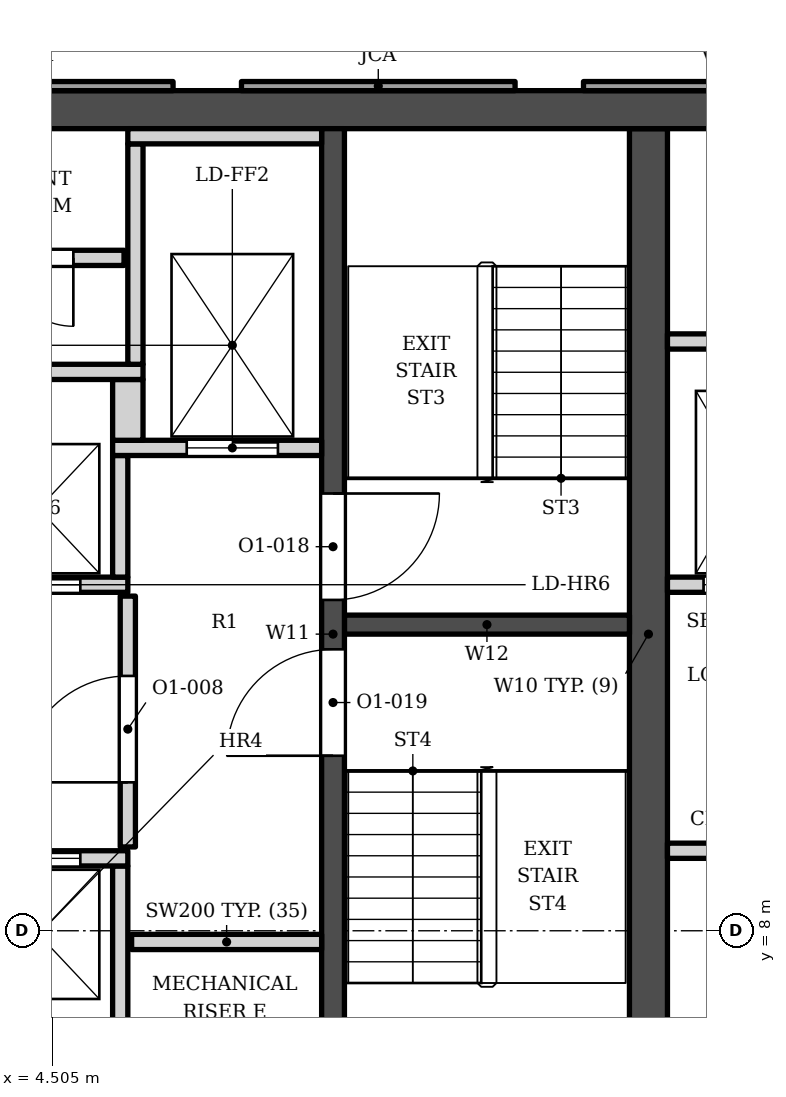
"""IFC4 building model, lengths in metres.
Left out: names, types, materials, properties, quantities, classifications, styles, units other than length and angle.
Written with IfcOpenShell. Run it as: python <this file> out.ifc"""

import sys

from ifc_helpers import new_model, si_unit, direction, frame, frame_2d, origin, place, context, subcontext, project, spatial, polyline, rectangle, outline, extrude, element, fill, save


model = new_model("IFC4")
c1 = context("Model", 3, precision=1e-05, world=origin(), true_north=direction((0.0, 1.0)))
c2 = subcontext(c1, "Body", "Model", "MODEL_VIEW")
j1 = project(units=[si_unit("LENGTHUNIT", "METRE"), si_unit("PLANEANGLEUNIT", "RADIAN")], contexts=[c1])
p1 = place(None, origin())
s1 = spatial("IfcSite", under=j1, at=p1, CompositionType="ELEMENT")
p2 = place(p1, origin())
s2 = spatial("IfcBuilding", under=s1, at=p2, CompositionType="ELEMENT")
p3 = place(p2, frame((0.0, 0.0, 144.6)))
s3 = spatial("IfcBuildingStorey", under=s2, at=p3, CompositionType="ELEMENT", Elevation=144.6)
p4 = place(p3, frame((-15.1, 18.802, 0.0), z_axis=(0.0, 0.0, 1.0), x_axis=(1.0, 0.0, 0.0)))
e1 = element("IfcWall", 1, at=p4, inside=s3, PredefinedType="SHEAR", context=c2, shape_type="SweptSolid", body=[
    extrude(rectangle(XDim=30.2, YDim=0.5, at=frame_2d((15.1, 0.0))), origin(), (0.0, 0.0, 1.0), 3.9),
])
p5 = place(p3, frame((12.35, 5.253, 0.0), z_axis=(0.0, 0.0, 1.0), x_axis=(0.0, 1.0, 0.0)))
e2 = element("IfcWall", 2, at=p5, inside=s3, PredefinedType="SHEAR", context=c2, shape_type="SweptSolid", body=[
    extrude(rectangle(XDim=13.3, YDim=0.5, at=frame_2d((6.65, 0.0))), origin(), (0.0, 0.0, 1.0), 3.9),
])
p6 = place(p3, frame((8.2, 5.253, 0.0), z_axis=(0.0, 0.0, 1.0), x_axis=(0.0, 1.0, 0.0)))
e3 = element("IfcWall", 3, at=p6, inside=s3, PredefinedType="SHEAR", context=c2, shape_type="SweptSolid", body=[
    extrude(rectangle(XDim=13.3, YDim=0.3, at=frame_2d((6.65, 0.0))), origin(), (0.0, 0.0, 1.0), 3.9),
])
p7 = place(p6, frame((7.1, 0.0, 0.0)))
e4 = element("IfcOpeningElement", 4, at=p7, cuts=e3, PredefinedType="OPENING", context=c2, shape_type="SweptSolid", body=[
    extrude(rectangle(XDim=1.4, YDim=2.1, at=frame_2d((0.7, 1.05))), frame((0.0, 0.16, 0.0), z_axis=(0.0, -1.0, 0.0), x_axis=(1.0, 0.0, 0.0)), (0.0, 0.0, 1.0), 0.32),
])
p8 = place(p6, frame((5.05, 0.0, 0.0)))
e5 = element("IfcOpeningElement", 5, at=p8, cuts=e3, PredefinedType="OPENING", context=c2, shape_type="SweptSolid", body=[
    extrude(rectangle(XDim=1.4, YDim=2.1, at=frame_2d((0.7, 1.05))), frame((0.0, 0.16, 0.0), z_axis=(0.0, -1.0, 0.0), x_axis=(1.0, 0.0, 0.0)), (0.0, 0.0, 1.0), 0.32),
])
p9 = place(p3, frame((8.35, 12.028, 0.0), z_axis=(0.0, 0.0, 1.0), x_axis=(1.0, 0.0, 0.0)))
e6 = element("IfcWall", 6, at=p9, inside=s3, PredefinedType="SHEAR", context=c2, shape_type="SweptSolid", body=[
    extrude(rectangle(XDim=3.75, YDim=0.25, at=frame_2d((1.875, 0.0))), origin(), (0.0, 0.0, 1.0), 3.9),
])
p10 = place(p3, origin())
e7 = element("IfcWall", 7, at=p10, inside=s3, PredefinedType="ELEMENTEDWALL", context=c2, shape_type="SweptSolid", body=[
    extrude(outline(polyline([(11.495, 19.173), (11.495, 19.052), (15.095, 19.052), (15.095, 19.173), (11.495, 19.173)])), origin(), (0.0, 0.0, 1.0), 3.0),
])
p11 = place(p3, origin())
e8 = element("IfcWall", 8, at=p11, inside=s3, PredefinedType="SOLIDWALL", context=c2, shape_type="SweptSolid", body=[
    extrude(outline(polyline([(6.995, 19.173), (6.995, 19.052), (10.595, 19.052), (10.595, 19.173), (6.995, 19.173)])), origin(), (0.0, 0.0, 1.0), 3.0),
])
p12 = place(p3, origin())
e9 = element("IfcWall", 9, at=p12, inside=s3, PredefinedType="ELEMENTEDWALL", context=c2, shape_type="SweptSolid", body=[
    extrude(outline(polyline([(2.495, 19.173), (2.495, 19.052), (6.095, 19.052), (6.095, 19.173), (2.495, 19.173)])), origin(), (0.0, 0.0, 1.0), 3.0),
])
for number, where, z_axis, x_axis in (
    (10, (5.4, 6.353, 0.0), (0.0, 0.0, 1.0), (0.0, 1.0, 0.0)),
    (11, (5.55, 7.853, 0.0), (0.0, 0.0, 1.0), (1.0, 0.0, 0.0)),
):
    element("IfcWall", number, at=place(p3, frame(where, z_axis=z_axis, x_axis=x_axis)), inside=s3, PredefinedType="SOLIDWALL", context=c2, shape_type="SweptSolid", body=[
        extrude(rectangle(XDim=2.5, YDim=0.2, at=frame_2d((1.25, 0.0))), origin(), (0.0, 0.0, 1.0), 3.73),
    ])
p13 = place(p3, frame((1.0, 8.953, 0.0), z_axis=(0.0, 0.0, 1.0), x_axis=(1.0, 0.0, 0.0)))
e12 = element("IfcWall", 12, at=p13, inside=s3, PredefinedType="SOLIDWALL", context=c2, shape_type="SweptSolid", body=[
    extrude(rectangle(XDim=4.5, YDim=0.2, at=frame_2d((2.25, 0.0))), origin(), (0.0, 0.0, 1.0), 3.73),
])
p14 = place(p13, frame((0.625, 0.0, 0.0)))
e13 = element("IfcOpeningElement", 13, at=p14, cuts=e12, PredefinedType="OPENING", context=c2, shape_type="SweptSolid", body=[
    extrude(rectangle(XDim=1.1, YDim=2.1, at=frame_2d((0.55, 1.05))), frame((0.0, 0.11, 0.0), z_axis=(0.0, -1.0, 0.0), x_axis=(1.0, 0.0, 0.0)), (0.0, 0.0, 1.0), 0.22),
])
p15 = place(p13, frame((2.775, 0.0, 0.0)))
e14 = element("IfcOpeningElement", 14, at=p15, cuts=e12, PredefinedType="OPENING", context=c2, shape_type="SweptSolid", body=[
    extrude(rectangle(XDim=1.1, YDim=2.1, at=frame_2d((0.55, 1.05))), frame((0.0, 0.11, 0.0), z_axis=(0.0, -1.0, 0.0), x_axis=(1.0, 0.0, 0.0)), (0.0, 0.0, 1.0), 0.22),
])
p16 = place(p3, frame((12.6, 9.052, 0.0), z_axis=(0.0, 0.0, 1.0), x_axis=(1.0, 0.0, 0.0)))
e15 = element("IfcWall", 15, at=p16, inside=s3, PredefinedType="PARTITIONING", context=c2, shape_type="SweptSolid", body=[
    extrude(rectangle(XDim=2.5, YDim=0.2, at=frame_2d((1.25, 0.0))), origin(), (0.0, 0.0, 1.0), 3.73),
])
p17 = place(p3, frame((5.5, 9.103, 0.0), z_axis=(0.0, 0.0, 1.0), x_axis=(0.0, 1.0, 0.0)))
e16 = element("IfcWall", 16, at=p17, inside=s3, PredefinedType="SOLIDWALL", context=c2, shape_type="SweptSolid", body=[
    extrude(rectangle(XDim=3.3, YDim=0.2, at=frame_2d((1.65, 0.0))), origin(), (0.0, 0.0, 1.0), 3.73),
])
p18 = place(p17, frame((0.85, 0.0, 0.0)))
e17 = element("IfcOpeningElement", 17, at=p18, cuts=e16, PredefinedType="OPENING", context=c2, shape_type="SweptSolid", body=[
    extrude(rectangle(XDim=1.4, YDim=2.1, at=frame_2d((0.7, 1.05))), frame((0.0, 0.11, 0.0), z_axis=(0.0, -1.0, 0.0), x_axis=(1.0, 0.0, 0.0)), (0.0, 0.0, 1.0), 0.22),
])
p19 = place(p3, frame((-1.5, 12.552, 0.0), z_axis=(0.0, 0.0, 1.0), x_axis=(1.0, 0.0, 0.0)))
e18 = element("IfcWall", 18, at=p19, inside=s3, PredefinedType="SOLIDWALL", context=c2, shape_type="SweptSolid", body=[
    extrude(rectangle(XDim=7.0, YDim=0.2, at=frame_2d((3.5, 0.0))), origin(), (0.0, 0.0, 1.0), 3.73),
])
p20 = place(p19, frame((3.075, 0.0, 0.0)))
e19 = element("IfcOpeningElement", 19, at=p20, cuts=e18, PredefinedType="OPENING", context=c2, shape_type="SweptSolid", body=[
    extrude(rectangle(XDim=1.1, YDim=2.1, at=frame_2d((0.55, 1.05))), frame((0.0, 0.11, 0.0), z_axis=(0.0, -1.0, 0.0), x_axis=(1.0, 0.0, 0.0)), (0.0, 0.0, 1.0), 0.22),
])
p21 = place(p19, frame((5.275, 0.0, 0.0)))
e20 = element("IfcOpeningElement", 20, at=p21, cuts=e18, PredefinedType="OPENING", context=c2, shape_type="SweptSolid", body=[
    extrude(rectangle(XDim=1.1, YDim=2.1, at=frame_2d((0.55, 1.05))), frame((0.0, 0.11, 0.0), z_axis=(0.0, -1.0, 0.0), x_axis=(1.0, 0.0, 0.0)), (0.0, 0.0, 1.0), 0.22),
])
p22 = place(p3, frame((12.6, 12.552, 0.0), z_axis=(0.0, 0.0, 1.0), x_axis=(1.0, 0.0, 0.0)))
e21 = element("IfcWall", 21, at=p22, inside=s3, PredefinedType="SOLIDWALL", context=c2, shape_type="SweptSolid", body=[
    extrude(rectangle(XDim=2.15, YDim=0.2, at=frame_2d((1.075, 0.0))), origin(), (0.0, 0.0, 1.0), 3.73),
])
p23 = place(p22, frame((0.475, 0.0, 0.0)))
e22 = element("IfcOpeningElement", 22, at=p23, cuts=e21, PredefinedType="OPENING", context=c2, shape_type="SweptSolid", body=[
    extrude(rectangle(XDim=1.2, YDim=2.1, at=frame_2d((0.6, 1.05))), frame((0.0, 0.11, 0.0), z_axis=(0.0, -1.0, 0.0), x_axis=(1.0, 0.0, 0.0)), (0.0, 0.0, 1.0), 0.22),
])
p24 = place(p3, frame((5.4, 12.653, 0.0), z_axis=(0.0, 0.0, 1.0), x_axis=(0.0, 1.0, 0.0)))
e23 = element("IfcWall", 23, at=p24, inside=s3, PredefinedType="SOLIDWALL", context=c2, shape_type="SweptSolid", body=[
    extrude(rectangle(XDim=1.6, YDim=0.2, at=frame_2d((0.8, 0.0))), origin(), (0.0, 0.0, 1.0), 3.73),
])
p25 = place(p3, frame((5.3, 14.353, 0.0), z_axis=(0.0, 0.0, 1.0), x_axis=(1.0, 0.0, 0.0)))
e24 = element("IfcWall", 24, at=p25, inside=s3, PredefinedType="SOLIDWALL", context=c2, shape_type="SweptSolid", body=[
    extrude(rectangle(XDim=2.75, YDim=0.2, at=frame_2d((1.375, 0.0))), origin(), (0.0, 0.0, 1.0), 3.73),
])
p26 = place(p25, frame((0.975, 0.0, 0.0)))
e25 = element("IfcOpeningElement", 25, at=p26, cuts=e24, PredefinedType="OPENING", context=c2, shape_type="SweptSolid", body=[
    extrude(rectangle(XDim=1.2, YDim=2.1, at=frame_2d((0.6, 1.05))), frame((0.0, 0.11, 0.0), z_axis=(0.0, -1.0, 0.0), x_axis=(1.0, 0.0, 0.0)), (0.0, 0.0, 1.0), 0.22),
])
p27 = place(p3, frame((5.5, 14.453, 0.0), z_axis=(0.0, 0.0, 1.0), x_axis=(0.0, 1.0, 0.0)))
e26 = element("IfcWall", 26, at=p27, inside=s3, PredefinedType="SOLIDWALL", context=c2, shape_type="SweptSolid", body=[
    extrude(rectangle(XDim=0.8, YDim=0.4, at=frame_2d((0.4, 0.0))), origin(), (0.0, 0.0, 1.0), 3.73),
])
p28 = place(p3, frame((-1.5, 15.353, 0.0), z_axis=(0.0, 0.0, 1.0), x_axis=(1.0, 0.0, 0.0)))
e27 = element("IfcWall", 27, at=p28, inside=s3, PredefinedType="SOLIDWALL", context=c2, shape_type="SweptSolid", body=[
    extrude(rectangle(XDim=7.2, YDim=0.2, at=frame_2d((3.6, 0.0))), origin(), (0.0, 0.0, 1.0), 3.73),
])
p29 = place(p3, frame((5.6, 15.453, 0.0), z_axis=(0.0, 0.0, 1.0), x_axis=(0.0, 1.0, 0.0)))
e28 = element("IfcWall", 28, at=p29, inside=s3, PredefinedType="SOLIDWALL", context=c2, shape_type="SweptSolid", body=[
    extrude(rectangle(XDim=2.9, YDim=0.2, at=frame_2d((1.45, 0.0))), origin(), (0.0, 0.0, 1.0), 3.73),
])
p30 = place(p3, frame((12.6, 15.753, 0.0), z_axis=(0.0, 0.0, 1.0), x_axis=(1.0, 0.0, 0.0)))
e29 = element("IfcWall", 29, at=p30, inside=s3, PredefinedType="SOLIDWALL", context=c2, shape_type="SweptSolid", body=[
    extrude(rectangle(XDim=2.15, YDim=0.2, at=frame_2d((1.075, 0.0))), origin(), (0.0, 0.0, 1.0), 3.73),
])
p31 = place(p3, frame((-1.6, 16.853, 0.0), z_axis=(0.0, 0.0, 1.0), x_axis=(1.0, 0.0, 0.0)))
e30 = element("IfcWall", 30, at=p31, inside=s3, PredefinedType="SOLIDWALL", context=c2, shape_type="SweptSolid", body=[
    extrude(rectangle(XDim=7.05, YDim=0.2, at=frame_2d((3.525, 0.0))), origin(), (0.0, 0.0, 1.0), 3.73),
])
p32 = place(p31, frame((0.817, 0.0, 0.0)))
e31 = element("IfcOpeningElement", 31, at=p32, cuts=e30, PredefinedType="OPENING", context=c2, shape_type="SweptSolid", body=[
    extrude(rectangle(XDim=0.9, YDim=2.1, at=frame_2d((0.45, 1.05))), frame((0.0, 0.11, 0.0), z_axis=(0.0, -1.0, 0.0), x_axis=(1.0, 0.0, 0.0)), (0.0, 0.0, 1.0), 0.22),
])
p33 = place(p31, frame((3.15, 0.0, 0.0)))
e32 = element("IfcOpeningElement", 32, at=p33, cuts=e30, PredefinedType="OPENING", context=c2, shape_type="SweptSolid", body=[
    extrude(rectangle(XDim=0.9, YDim=2.1, at=frame_2d((0.45, 1.05))), frame((0.0, 0.11, 0.0), z_axis=(0.0, -1.0, 0.0), x_axis=(1.0, 0.0, 0.0)), (0.0, 0.0, 1.0), 0.22),
])
p34 = place(p31, frame((5.483, 0.0, 0.0)))
e33 = element("IfcOpeningElement", 33, at=p34, cuts=e30, PredefinedType="OPENING", context=c2, shape_type="SweptSolid", body=[
    extrude(rectangle(XDim=0.9, YDim=2.1, at=frame_2d((0.45, 1.05))), frame((0.0, 0.11, 0.0), z_axis=(0.0, -1.0, 0.0), x_axis=(1.0, 0.0, 0.0)), (0.0, 0.0, 1.0), 0.22),
])
p35 = place(p3, frame((5.5, 18.453, 0.0), z_axis=(0.0, 0.0, 1.0), x_axis=(1.0, 0.0, 0.0)))
e34 = element("IfcWall", 34, at=p35, inside=s3, PredefinedType="SOLIDWALL", context=c2, shape_type="SweptSolid", body=[
    extrude(rectangle(XDim=2.55, YDim=0.2, at=frame_2d((1.275, 0.0))), origin(), (0.0, 0.0, 1.0), 3.73),
])
p36 = place(p15, origin())
e35 = element("IfcDoor", 35, at=p36, inside=s3, OperationType="DOUBLE_DOOR_SLIDING", PredefinedType="DOOR", context=c2, shape_type="SweptSolid", body=[
    extrude(rectangle(XDim=1.1, YDim=2.1, at=frame_2d((0.55, 1.05))), frame((0.0, 0.025, 0.0), z_axis=(0.0, -1.0, 0.0), x_axis=(1.0, 0.0, 0.0)), (0.0, 0.0, 1.0), 0.05),
])
fill(e14, e35)
p37 = place(p21, origin())
e36 = element("IfcDoor", 36, at=p37, inside=s3, OperationType="DOUBLE_DOOR_SLIDING", PredefinedType="DOOR", context=c2, shape_type="SweptSolid", body=[
    extrude(rectangle(XDim=1.1, YDim=2.1, at=frame_2d((0.55, 1.05))), frame((0.0, 0.025, 0.0), z_axis=(0.0, -1.0, 0.0), x_axis=(1.0, 0.0, 0.0)), (0.0, 0.0, 1.0), 0.05),
])
fill(e20, e36)
p38 = place(p26, origin())
e37 = element("IfcDoor", 37, at=p38, inside=s3, OperationType="DOUBLE_DOOR_SLIDING", PredefinedType="DOOR", context=c2, shape_type="SweptSolid", body=[
    extrude(rectangle(XDim=1.2, YDim=2.1, at=frame_2d((0.6, 1.05))), frame((0.0, 0.025, 0.0), z_axis=(0.0, -1.0, 0.0), x_axis=(1.0, 0.0, 0.0)), (0.0, 0.0, 1.0), 0.05),
])
fill(e25, e37)
p39 = place(p23, origin())
e38 = element("IfcDoor", 38, at=p39, inside=s3, OperationType="DOUBLE_DOOR_SLIDING", PredefinedType="DOOR", context=c2, shape_type="SweptSolid", body=[
    extrude(rectangle(XDim=1.2, YDim=2.1, at=frame_2d((0.6, 1.05))), frame((0.0, 0.025, 0.0), z_axis=(0.0, -1.0, 0.0), x_axis=(1.0, 0.0, 0.0)), (0.0, 0.0, 1.0), 0.05),
])
fill(e22, e38)
p40 = place(p7, origin())
e39 = element("IfcDoor", 39, at=p40, inside=s3, OperationType="SINGLE_SWING_RIGHT", PredefinedType="DOOR", context=c2, shape_type="SweptSolid", body=[
    extrude(rectangle(XDim=1.4, YDim=2.1, at=frame_2d((0.7, 1.05))), frame((0.0, 0.025, 0.0), z_axis=(0.0, -1.0, 0.0), x_axis=(1.0, 0.0, 0.0)), (0.0, 0.0, 1.0), 0.05),
])
fill(e4, e39)
p41 = place(p8, origin())
e40 = element("IfcDoor", 40, at=p41, inside=s3, OperationType="SINGLE_SWING_LEFT", PredefinedType="DOOR", context=c2, shape_type="SweptSolid", body=[
    extrude(rectangle(XDim=1.4, YDim=2.1, at=frame_2d((0.7, 1.05))), frame((0.0, 0.025, 0.0), z_axis=(0.0, -1.0, 0.0), x_axis=(1.0, 0.0, 0.0)), (0.0, 0.0, 1.0), 0.05),
])
fill(e5, e40)
p42 = place(p18, origin())
e41 = element("IfcDoor", 41, at=p42, inside=s3, OperationType="SINGLE_SWING_LEFT", PredefinedType="DOOR", context=c2, shape_type="SweptSolid", body=[
    extrude(rectangle(XDim=1.4, YDim=2.1, at=frame_2d((0.7, 1.05))), frame((0.0, 0.025, 0.0), z_axis=(0.0, -1.0, 0.0), x_axis=(1.0, 0.0, 0.0)), (0.0, 0.0, 1.0), 0.05),
])
fill(e17, e41)
p43 = place(p34, origin())
e42 = element("IfcDoor", 42, at=p43, inside=s3, OperationType="SINGLE_SWING_RIGHT", PredefinedType="DOOR", context=c2, shape_type="SweptSolid", body=[
    extrude(rectangle(XDim=0.9, YDim=2.1, at=frame_2d((0.45, 1.05))), frame((0.0, 0.025, 0.0), z_axis=(0.0, -1.0, 0.0), x_axis=(1.0, 0.0, 0.0)), (0.0, 0.0, 1.0), 0.05),
])
fill(e33, e42)
save(model, sys.argv[1])
